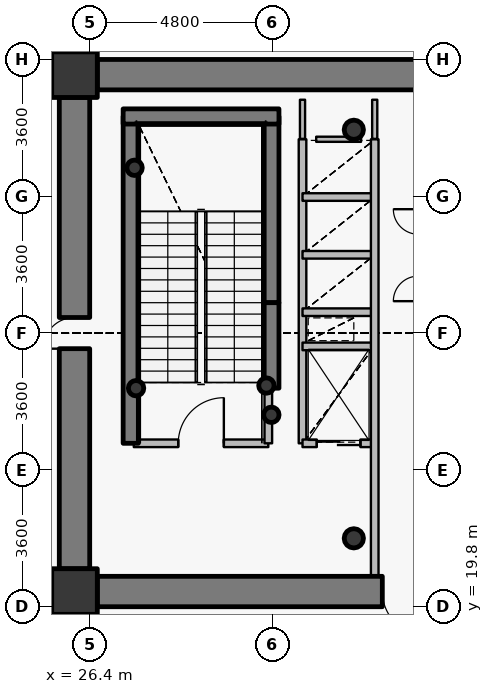
"""IFC4 building model, lengths in metres.
Left out: names, types, materials, properties, quantities, classifications, styles, units other than length and angle.
Written with IfcOpenShell. Run it as: python <this file> out.ifc"""

import sys

from ifc_helpers import new_model, si_unit, direction, frame, frame_2d, origin, origin_2d, place, context, subcontext, project, spatial, rectangle, hollow_circle, extrude, source, transform, mapped, element, fill, save


model = new_model("IFC4")
c1 = context("Model", 3, precision=1e-05, world=origin(), true_north=direction((0.0, 1.0)))
c2 = subcontext(c1, "Body", "Model", "MODEL_VIEW")
j1 = project(units=[si_unit("LENGTHUNIT", "METRE"), si_unit("PLANEANGLEUNIT", "RADIAN")], contexts=[c1])
p1 = place(None, origin())
s1 = spatial("IfcSite", under=j1, at=p1, CompositionType="ELEMENT")
p2 = place(p1, origin())
s2 = spatial("IfcBuilding", under=s1, at=p2, CompositionType="ELEMENT")
p3 = place(p2, frame((0.0, 0.0, 92.4)))
s3 = spatial("IfcBuildingStorey", under=s2, at=p3, CompositionType="ELEMENT", Elevation=92.4)
for number, where, z_axis, x_axis in (
    (1, (26.0, 20.2, 0.0), (0.0, 0.0, 1.0), (1.0, 0.0, 0.0)),
    (2, (26.0, 33.8, 0.0), (0.0, 0.0, 1.0), (1.0, 0.0, 0.0)),
):
    element("IfcColumn", number, at=place(p3, frame(where, z_axis=z_axis, x_axis=x_axis)), inside=s3, PredefinedType="COLUMN", context=c2, shape_type="SweptSolid", body=[
        extrude(rectangle(XDim=1.2, YDim=1.2, at=origin_2d()), origin(), (0.0, 0.0, 1.0), 4.8),
    ])
for number, where, z_axis, x_axis in (
    (3, (33.35, 21.6, 0.0), (0.0, 0.0, 1.0), (1.0, 0.0, 0.0)),
    (4, (33.35, 32.35, 0.0), (0.0, 0.0, 1.0), (1.0, 0.0, 0.0)),
):
    element("IfcColumn", number, at=place(p3, frame(where, z_axis=z_axis, x_axis=x_axis)), inside=s3, PredefinedType="COLUMN", context=c2, shape_type="SweptSolid", body=[
        extrude(hollow_circle(Radius=0.254, WallThickness=0.02, at=origin_2d()), origin(), (0.0, 0.0, 1.0), 4.8),
    ])
p4 = place(p3, frame((27.48, 24.1, 0.0), z_axis=(0.0, 0.0, 1.0), x_axis=(0.0, 1.0, 0.0)))
e5 = element("IfcWall", 5, at=p4, inside=s3, PredefinedType="SHEAR", context=c2, shape_type="SweptSolid", body=[
    extrude(rectangle(XDim=8.6, YDim=0.4, at=frame_2d((4.3, 0.0))), origin(), (0.0, 0.0, 1.0), 4.8),
])
p5 = place(p3, frame((31.18, 27.8, 0.0), z_axis=(0.0, 0.0, 1.0), x_axis=(0.0, 1.0, 0.0)))
e6 = element("IfcWall", 6, at=p5, inside=s3, PredefinedType="SHEAR", context=c2, shape_type="SweptSolid", body=[
    extrude(rectangle(XDim=4.9, YDim=0.4, at=frame_2d((2.45, 0.0))), origin(), (0.0, 0.0, 1.0), 4.8),
])
p6 = place(p3, frame((27.28, 32.7, 0.0), z_axis=(0.0, 0.0, 1.0), x_axis=(1.0, 0.0, 0.0)))
e7 = element("IfcWall", 7, at=p6, inside=s3, PredefinedType="SHEAR", context=c2, shape_type="SweptSolid", body=[
    extrude(rectangle(XDim=4.1, YDim=0.4, at=frame_2d((2.05, 0.0))), origin(), (0.0, 0.0, 1.0), 4.8),
])
for number, where, z_axis, x_axis in (
    (8, (27.58, 31.35, 0.0), (0.0, 0.0, 1.0), (1.0, 0.0, 0.0)),
    (9, (31.05, 25.62, 0.0), (0.0, 0.0, 1.0), (1.0, 0.0, 0.0)),
    (10, (31.18, 24.85, 0.0), (0.0, 0.0, 1.0), (1.0, 0.0, 0.0)),
    (11, (27.62, 25.55, 0.0), (0.0, 0.0, 1.0), (1.0, 0.0, 0.0)),
):
    element("IfcColumn", number, at=place(p3, frame(where, z_axis=z_axis, x_axis=x_axis)), inside=s3, PredefinedType="COLUMN", context=c2, shape_type="SweptSolid", body=[
        extrude(hollow_circle(Radius=0.203, WallThickness=0.016, at=origin_2d()), origin(), (0.0, 0.0, 1.0), 4.8),
    ])
p7 = place(p3, frame((26.6, 33.8, 0.0), z_axis=(0.0, 0.0, 1.0), x_axis=(1.0, 0.0, 0.0)))
e12 = element("IfcWall", 12, at=p7, inside=s3, PredefinedType="SHEAR", context=c2, shape_type="SweptSolid", body=[
    extrude(rectangle(XDim=18.8, YDim=0.8, at=frame_2d((9.4, 0.0))), origin(), (0.0, 0.0, 1.0), 4.0),
])
p8 = place(p3, frame((45.4, 20.2, 0.0), z_axis=(0.0, 0.0, 1.0), x_axis=(-1.0, 0.0, 0.0)))
e13 = element("IfcWall", 13, at=p8, inside=s3, PredefinedType="SHEAR", context=c2, shape_type="SweptSolid", body=[
    extrude(rectangle(XDim=18.8, YDim=0.8, at=frame_2d((9.4, 0.0))), origin(), (0.0, 0.0, 1.0), 4.0),
])
p9 = place(p8, frame((10.15, 0.0, 0.0)))
e14 = element("IfcOpeningElement", 14, at=p9, cuts=e13, PredefinedType="OPENING", context=c2, shape_type="SweptSolid", body=[
    extrude(rectangle(XDim=1.15, YDim=2.15, at=origin_2d()), frame((0.575, 0.41, 1.075), z_axis=(0.0, -1.0, 0.0), x_axis=(1.0, 0.0, 0.0)), (0.0, 0.0, 1.0), 0.82),
])
p10 = place(p3, frame((26.0, 20.8, 0.0), z_axis=(0.0, 0.0, 1.0), x_axis=(0.0, 1.0, 0.0)))
e15 = element("IfcWall", 15, at=p10, inside=s3, PredefinedType="SHEAR", context=c2, shape_type="SweptSolid", body=[
    extrude(rectangle(XDim=12.4, YDim=0.8, at=frame_2d((6.2, 0.0))), origin(), (0.0, 0.0, 1.0), 4.0),
])
p11 = place(p10, frame((5.79, 0.0, 0.0)))
e16 = element("IfcOpeningElement", 16, at=p11, cuts=e15, PredefinedType="OPENING", context=c2, shape_type="SweptSolid", body=[
    extrude(rectangle(XDim=0.82, YDim=2.1, at=origin_2d()), frame((0.41, 0.41, 1.05), z_axis=(0.0, -1.0, 0.0), x_axis=(1.0, 0.0, 0.0)), (0.0, 0.0, 1.0), 0.82),
])
p12 = place(p3, frame((31.18, 25.55, 0.0), z_axis=(0.0, 0.0, 1.0), x_axis=(0.0, 1.0, 0.0)))
e17 = element("IfcWall", 17, at=p12, inside=s3, PredefinedType="SHEAR", context=c2, shape_type="SweptSolid", body=[
    extrude(rectangle(XDim=2.25, YDim=0.4, at=frame_2d((1.125, 0.0))), origin(), (0.0, 0.0, 1.0), 4.15),
])
p13 = place(p3, frame((27.56, 24.1, 0.0), z_axis=(0.0, 0.0, 1.0), x_axis=(1.0, 0.0, 0.0)))
e18 = element("IfcWall", 18, at=p13, inside=s3, PredefinedType="PARTITIONING", context=c2, shape_type="SweptSolid", body=[
    extrude(rectangle(XDim=3.54, YDim=0.2, at=frame_2d((1.77, 0.0))), origin(), (0.0, 0.0, 1.0), 4.55),
])
p14 = place(p13, frame((1.17, 0.0, 0.0)))
e19 = element("IfcOpeningElement", 19, at=p14, cuts=e18, PredefinedType="OPENING", context=c2, shape_type="SweptSolid", body=[
    extrude(rectangle(XDim=1.2, YDim=2.15, at=origin_2d()), frame((0.6, 0.11, 1.075), z_axis=(0.0, -1.0, 0.0), x_axis=(1.0, 0.0, 0.0)), (0.0, 0.0, 1.0), 0.22),
])
p15 = place(p3, frame((31.1, 24.1, 0.0), z_axis=(0.0, 0.0, 1.0), x_axis=(0.0, 1.0, 0.0)))
e20 = element("IfcWall", 20, at=p15, inside=s3, PredefinedType="PARTITIONING", context=c2, shape_type="SweptSolid", body=[
    extrude(rectangle(XDim=1.44, YDim=0.2, at=frame_2d((0.72, 0.0))), origin(), (0.0, 0.0, 1.0), 4.55),
])
p16 = place(p3, frame((32.0, 24.1, 0.0), z_axis=(0.0, 0.0, 1.0), x_axis=(0.0, 1.0, 0.0)))
e21 = element("IfcWall", 21, at=p16, inside=s3, PredefinedType="PARTITIONING", context=c2, shape_type="SweptSolid", body=[
    extrude(rectangle(XDim=8.0, YDim=0.2, at=frame_2d((4.0, 0.0))), origin(), (0.0, 0.0, 1.0), 4.55),
])
p17 = place(p3, frame((32.0, 24.1, 0.0), z_axis=(0.0, 0.0, 1.0), x_axis=(1.0, 0.0, 0.0)))
e22 = element("IfcWall", 22, at=p17, inside=s3, PredefinedType="PARTITIONING", context=c2, shape_type="SweptSolid", body=[
    extrude(rectangle(XDim=1.9, YDim=0.2, at=frame_2d((0.95, 0.0))), origin(), (0.0, 0.0, 1.0), 4.135),
])
p18 = place(p17, frame((0.375, 0.0, 0.0)))
e23 = element("IfcOpeningElement", 23, at=p18, cuts=e22, PredefinedType="OPENING", context=c2, shape_type="SweptSolid", body=[
    extrude(rectangle(XDim=1.15, YDim=2.15, at=origin_2d()), frame((0.575, 0.11, 1.075), z_axis=(0.0, -1.0, 0.0), x_axis=(1.0, 0.0, 0.0)), (0.0, 0.0, 1.0), 0.22),
])
for number, where, z_axis, x_axis in (
    (24, (32.0, 26.65, 0.0), (0.0, 0.0, 1.0), (1.0, 0.0, 0.0)),
    (25, (32.0, 27.55, 0.0), (0.0, 0.0, 1.0), (1.0, 0.0, 0.0)),
    (26, (32.0, 29.06, 0.0), (0.0, 0.0, 1.0), (1.0, 0.0, 0.0)),
    (27, (32.0, 30.58, 0.0), (0.0, 0.0, 1.0), (1.0, 0.0, 0.0)),
):
    element("IfcWall", number, at=place(p3, frame(where, z_axis=z_axis, x_axis=x_axis)), inside=s3, PredefinedType="PARTITIONING", context=c2, shape_type="SweptSolid", body=[
        extrude(rectangle(XDim=1.9, YDim=0.2, at=frame_2d((0.95, 0.0))), origin(), (0.0, 0.0, 1.0), 4.135),
    ])
p19 = place(p3, frame((33.9, 20.6, 0.0), z_axis=(0.0, 0.0, 1.0), x_axis=(0.0, 1.0, 0.0)))
e28 = element("IfcWall", 28, at=p19, inside=s3, PredefinedType="PARTITIONING", context=c2, shape_type="SweptSolid", body=[
    extrude(rectangle(XDim=11.5, YDim=0.2, at=frame_2d((5.75, 0.0))), origin(), (0.0, 0.0, 1.0), 4.135),
])
p20 = place(p3, frame((32.36, 32.1, 0.0), z_axis=(0.0, 0.0, 1.0), x_axis=(1.0, 0.0, 0.0)))
e29 = element("IfcWall", 29, at=p20, inside=s3, PredefinedType="PARTITIONING", context=c2, shape_type="SweptSolid", body=[
    extrude(rectangle(XDim=1.18, YDim=0.135, at=frame_2d((0.59, 0.0))), origin(), (0.0, 0.0, 1.0), 4.135),
])
p21 = place(p3, frame((32.0, 33.14, 0.0), z_axis=(0.0, 0.0, 1.0), x_axis=(0.0, -1.0, 0.0)))
e30 = element("IfcWall", 30, at=p21, inside=s3, PredefinedType="PARTITIONING", context=c2, shape_type="SweptSolid", body=[
    extrude(rectangle(XDim=1.03, YDim=0.135, at=frame_2d((0.515, 0.0))), origin(), (0.0, 0.0, 1.0), 4.085),
])
p22 = place(p3, frame((33.9, 32.11, 0.0), z_axis=(0.0, 0.0, 1.0), x_axis=(0.0, 1.0, 0.0)))
e31 = element("IfcWall", 31, at=p22, inside=s3, PredefinedType="PARTITIONING", context=c2, shape_type="SweptSolid", body=[
    extrude(rectangle(XDim=1.03, YDim=0.135, at=frame_2d((0.515, 0.0))), origin(), (0.0, 0.0, 1.0), 4.135),
])
p23 = place(p3, frame((26.59, 34.2, 0.0), z_axis=(0.0, 0.0, 1.0), x_axis=(-1.0, 0.0, 0.0)))
e32 = element("IfcWall", 32, at=p23, inside=s3, PredefinedType="PARTITIONING", context=c2, shape_type="SweptSolid", body=[
    extrude(rectangle(XDim=0.99, YDim=0.135, at=frame_2d((0.495, 0.0))), origin(), (0.0, 0.0, 1.0), 3.985),
])
p24 = place(p3, frame((25.6, 33.893, 0.0), z_axis=(0.0, 0.0, 1.0), x_axis=(0.0, -1.0, 0.0)))
e33 = element("IfcWall", 33, at=p24, inside=s3, PredefinedType="PARTITIONING", context=c2, shape_type="SweptSolid", body=[
    extrude(rectangle(XDim=0.683, YDim=0.135, at=frame_2d((0.341, 0.0))), origin(), (0.0, 0.0, 1.0), 4.55),
])
p25 = place(p3, frame((25.6, 20.79, 0.0), z_axis=(0.0, 0.0, 1.0), x_axis=(0.0, -1.0, 0.0)))
e34 = element("IfcWall", 34, at=p25, inside=s3, PredefinedType="PARTITIONING", context=c2, shape_type="SweptSolid", body=[
    extrude(rectangle(XDim=0.99, YDim=0.135, at=frame_2d((0.495, 0.0))), origin(), (0.0, 0.0, 1.0), 4.55),
])
p26 = place(p3, frame((25.907, 19.8, 0.0), z_axis=(0.0, 0.0, 1.0), x_axis=(1.0, 0.0, 0.0)))
e35 = element("IfcWall", 35, at=p26, inside=s3, PredefinedType="PARTITIONING", context=c2, shape_type="SweptSolid", body=[
    extrude(rectangle(XDim=0.683, YDim=0.135, at=frame_2d((0.341, 0.0))), origin(), (0.0, 0.0, 1.0), 3.985),
])
m1 = source(origin(), c2, "Body", "SweptSolid", [
    extrude(rectangle(XDim=0.82, YDim=2.1, at=origin_2d()), frame((0.41, 0.025, 1.05), z_axis=(0.0, -1.0, 0.0), x_axis=(1.0, 0.0, 0.0)), (0.0, 0.0, 1.0), 0.05),
])
p27 = place(p11, origin())
e36 = element("IfcDoor", 36, at=p27, inside=s3, OperationType="SINGLE_SWING_LEFT", PredefinedType="DOOR", context=c2, shape_type="MappedRepresentation", body=[
    mapped(m1, transform((0.0, 0.0, 0.0), x_axis=(1.0, 0.0, 0.0), y_axis=(0.0, 1.0, 0.0), z_axis=(0.0, 0.0, 1.0), scale=1.0)),
])
fill(e16, e36)
m2 = source(origin(), c2, "Body", "SweptSolid", [
    extrude(rectangle(XDim=1.15, YDim=2.15, at=origin_2d()), frame((0.575, 0.025, 1.075), z_axis=(0.0, -1.0, 0.0), x_axis=(1.0, 0.0, 0.0)), (0.0, 0.0, 1.0), 0.05),
])
p28 = place(p9, origin())
e37 = element("IfcDoor", 37, at=p28, inside=s3, OperationType="SINGLE_SWING_LEFT", PredefinedType="DOOR", context=c2, shape_type="MappedRepresentation", body=[
    mapped(m2, transform((0.0, 0.0, 0.0), x_axis=(1.0, 0.0, 0.0), y_axis=(0.0, 1.0, 0.0), z_axis=(0.0, 0.0, 1.0), scale=1.0)),
])
fill(e14, e37)
m3 = source(origin(), c2, "Body", "SweptSolid", [
    extrude(rectangle(XDim=1.2, YDim=2.15, at=origin_2d()), frame((0.6, 0.025, 1.075), z_axis=(0.0, -1.0, 0.0), x_axis=(1.0, 0.0, 0.0)), (0.0, 0.0, 1.0), 0.05),
])
p29 = place(p14, origin())
e38 = element("IfcDoor", 38, at=p29, inside=s3, OperationType="SINGLE_SWING_RIGHT", PredefinedType="DOOR", context=c2, shape_type="MappedRepresentation", body=[
    mapped(m3, transform((0.0, 0.0, 0.0), x_axis=(1.0, 0.0, 0.0), y_axis=(0.0, 1.0, 0.0), z_axis=(0.0, 0.0, 1.0), scale=1.0)),
])
fill(e19, e38)
m4 = source(origin(), c2, "Body", "SweptSolid", [
    extrude(rectangle(XDim=1.15, YDim=2.15, at=origin_2d()), frame((0.575, 0.025, 1.075), z_axis=(0.0, -1.0, 0.0), x_axis=(1.0, 0.0, 0.0)), (0.0, 0.0, 1.0), 0.05),
])
p30 = place(p18, origin())
e39 = element("IfcDoor", 39, at=p30, inside=s3, OperationType="DOUBLE_DOOR_SLIDING", PredefinedType="USERDEFINED", context=c2, shape_type="MappedRepresentation", body=[
    mapped(m4, transform((0.0, 0.0, 0.0), x_axis=(1.0, 0.0, 0.0), y_axis=(0.0, 1.0, 0.0), z_axis=(0.0, 0.0, 1.0), scale=1.0)),
])
fill(e23, e39)
save(model, sys.argv[1])
